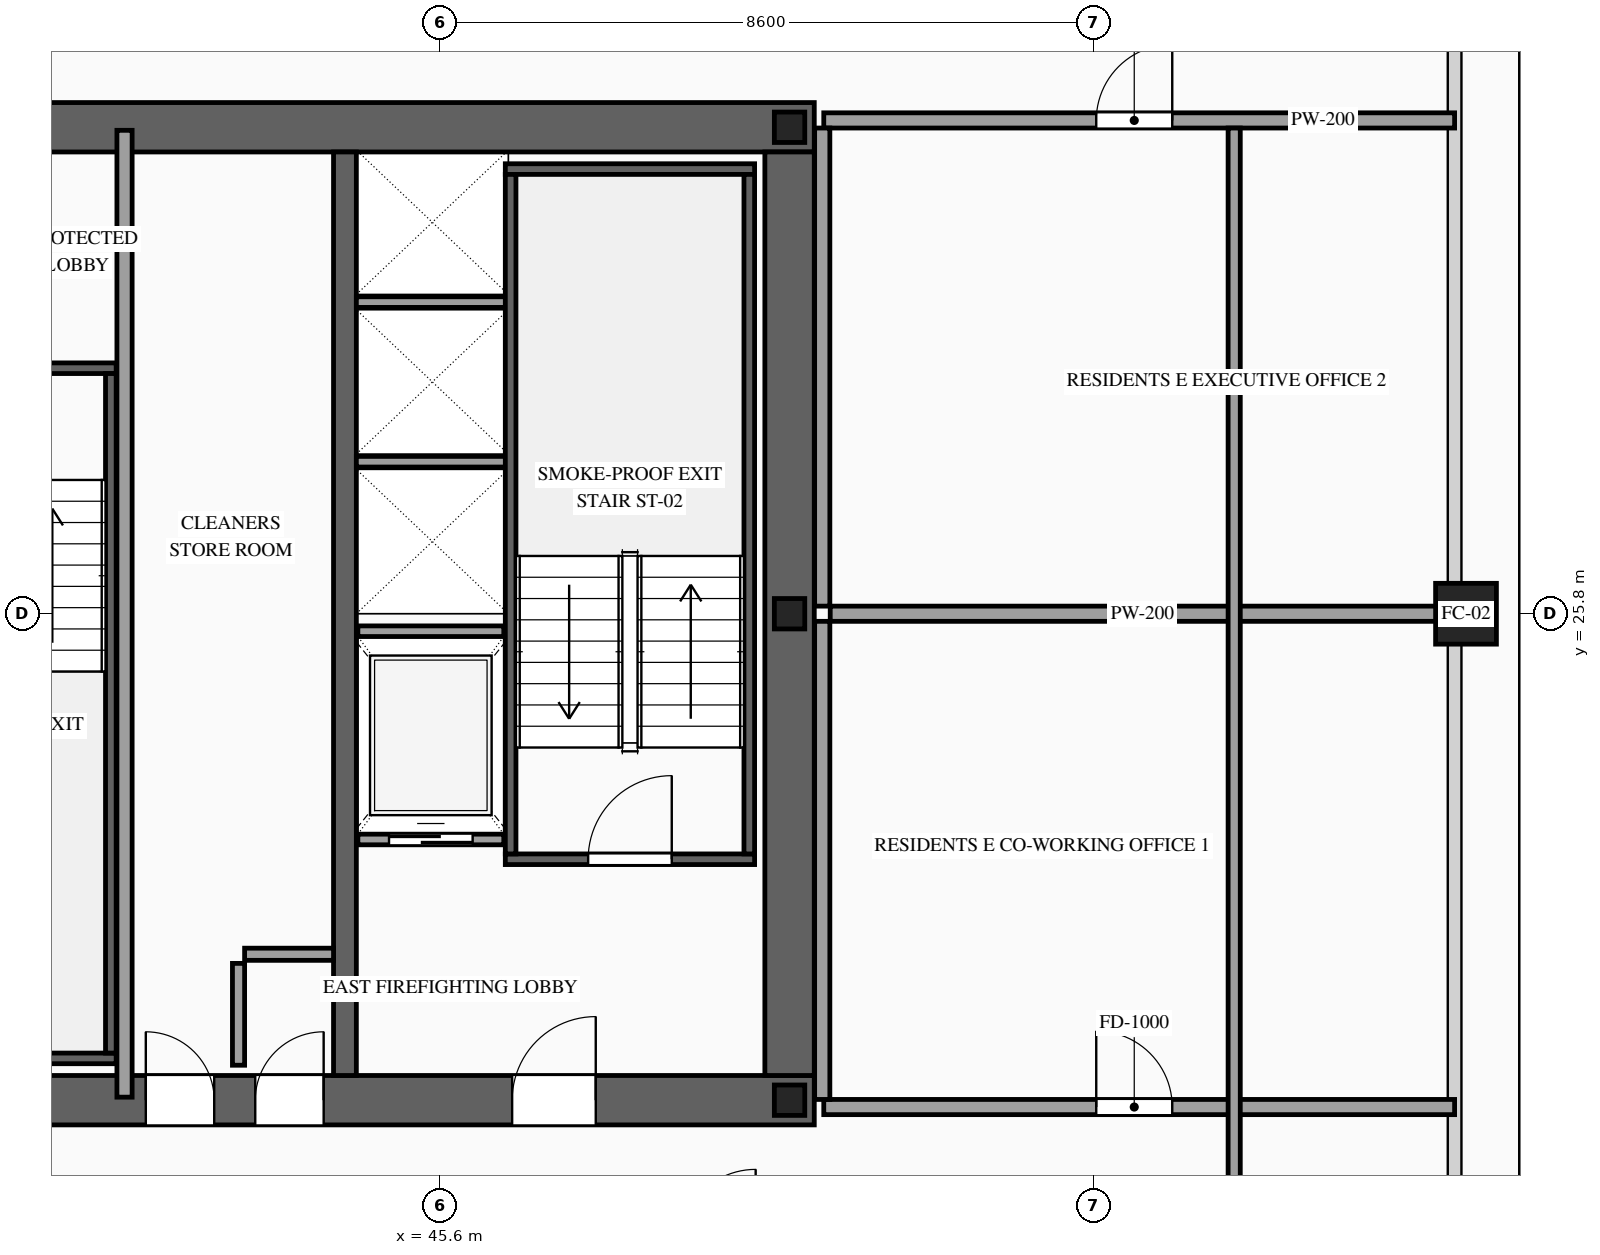
"""IFC4 building model, lengths in metres.
Left out: names, types, materials, properties, quantities, classifications, styles, units other than length and angle.
Written with IfcOpenShell. Run it as: python <this file> out.ifc"""

import sys

from ifc_helpers import new_model, si_unit, direction, frame, frame_2d, origin, origin_2d, place, context, subcontext, project, spatial, rectangle, hollow_rectangle, i_section, extrude, source, transform, mapped, element, fill, save


model = new_model("IFC4")
c1 = context("Model", 3, precision=1e-05, world=origin(), true_north=direction((0.0, 1.0)))
c2 = subcontext(c1, "Body", "Model", "MODEL_VIEW")
j1 = project(units=[si_unit("LENGTHUNIT", "METRE"), si_unit("PLANEANGLEUNIT", "RADIAN")], contexts=[c1])
p1 = place(None, origin())
s1 = spatial("IfcSite", under=j1, at=p1, CompositionType="ELEMENT")
p2 = place(p1, origin())
s2 = spatial("IfcBuilding", under=s1, at=p2, CompositionType="ELEMENT")
p3 = place(p2, frame((0.0, 0.0, 205.5)))
s3 = spatial("IfcBuildingStorey", under=s2, at=p3, CompositionType="ELEMENT", Elevation=205.5)
p4 = place(p3, frame((23.475, 19.4, 0.0), z_axis=(0.0, 0.0, 1.0), x_axis=(1.0, 0.0, 0.0)))
e1 = element("IfcWall", 1, at=p4, inside=s3, PredefinedType="SHEAR", context=c2, shape_type="SweptSolid", body=[
    extrude(rectangle(XDim=27.05, YDim=0.65, at=frame_2d((13.525, 0.0))), origin(), (0.0, 0.0, 1.0), 3.5),
])
p5 = place(p4, frame((1.975, 0.0, 0.0)))
e2 = element("IfcOpeningElement", 2, at=p5, cuts=e1, PredefinedType="OPENING", context=c2, shape_type="SweptSolid", body=[
    extrude(rectangle(XDim=1.1, YDim=2.2, at=frame_2d((0.55, 1.1))), frame((0.0, 0.34, 0.0), z_axis=(0.0, -1.0, 0.0), x_axis=(1.0, 0.0, 0.0)), (0.0, 0.0, 1.0), 0.68),
])
p6 = place(p4, frame((9.875, 0.0, 0.0)))
e3 = element("IfcOpeningElement", 3, at=p6, cuts=e1, PredefinedType="OPENING", context=c2, shape_type="SweptSolid", body=[
    extrude(rectangle(XDim=1.1, YDim=2.2, at=frame_2d((0.55, 1.1))), frame((0.0, 0.34, 0.0), z_axis=(0.0, -1.0, 0.0), x_axis=(1.0, 0.0, 0.0)), (0.0, 0.0, 1.0), 0.68),
])
p7 = place(p4, frame((23.075, 0.0, 0.0)))
e4 = element("IfcOpeningElement", 4, at=p7, cuts=e1, PredefinedType="OPENING", context=c2, shape_type="SweptSolid", body=[
    extrude(rectangle(XDim=1.1, YDim=2.2, at=frame_2d((0.55, 1.1))), frame((0.0, 0.34, 0.0), z_axis=(0.0, -1.0, 0.0), x_axis=(1.0, 0.0, 0.0)), (0.0, 0.0, 1.0), 0.68),
])
p8 = place(p4, frame((19.695, 0.0, 0.0)))
e5 = element("IfcOpeningElement", 5, at=p8, cuts=e1, PredefinedType="OPENING", context=c2, shape_type="SweptSolid", body=[
    extrude(rectangle(XDim=0.9, YDim=2.15, at=frame_2d((0.45, 1.075))), frame((0.0, 0.34, 0.0), z_axis=(0.0, -1.0, 0.0), x_axis=(1.0, 0.0, 0.0)), (0.0, 0.0, 1.0), 0.68),
])
p9 = place(p4, frame((18.255, 0.0, 0.0)))
e6 = element("IfcOpeningElement", 6, at=p9, cuts=e1, PredefinedType="OPENING", context=c2, shape_type="SweptSolid", body=[
    extrude(rectangle(XDim=0.9, YDim=2.15, at=frame_2d((0.45, 1.075))), frame((0.0, 0.34, 0.0), z_axis=(0.0, -1.0, 0.0), x_axis=(1.0, 0.0, 0.0)), (0.0, 0.0, 1.0), 0.68),
])
p10 = place(p3, frame((23.475, 32.2, 0.0), z_axis=(0.0, 0.0, 1.0), x_axis=(1.0, 0.0, 0.0)))
e7 = element("IfcWall", 7, at=p10, inside=s3, PredefinedType="SHEAR", context=c2, shape_type="SweptSolid", body=[
    extrude(rectangle(XDim=27.05, YDim=0.65, at=frame_2d((13.525, 0.0))), origin(), (0.0, 0.0, 1.0), 3.5),
])
p11 = place(p10, frame((4.595, 0.0, 0.0)))
e8 = element("IfcOpeningElement", 8, at=p11, cuts=e7, PredefinedType="OPENING", context=c2, shape_type="SweptSolid", body=[
    extrude(rectangle(XDim=0.9, YDim=2.15, at=frame_2d((0.45, 1.075))), frame((0.0, 0.34, 0.0), z_axis=(0.0, -1.0, 0.0), x_axis=(1.0, 0.0, 0.0)), (0.0, 0.0, 1.0), 0.68),
])
p12 = place(p10, frame((9.875, 0.0, 0.0)))
e9 = element("IfcOpeningElement", 9, at=p12, cuts=e7, PredefinedType="OPENING", context=c2, shape_type="SweptSolid", body=[
    extrude(rectangle(XDim=1.1, YDim=2.2, at=frame_2d((0.55, 1.1))), frame((0.0, 0.34, 0.0), z_axis=(0.0, -1.0, 0.0), x_axis=(1.0, 0.0, 0.0)), (0.0, 0.0, 1.0), 0.68),
])
p13 = place(p10, frame((15.725, 0.0, 0.0)))
e10 = element("IfcOpeningElement", 10, at=p13, cuts=e7, PredefinedType="OPENING", context=c2, shape_type="SweptSolid", body=[
    extrude(rectangle(XDim=1.1, YDim=2.2, at=frame_2d((0.55, 1.1))), frame((0.0, 0.34, 0.0), z_axis=(0.0, -1.0, 0.0), x_axis=(1.0, 0.0, 0.0)), (0.0, 0.0, 1.0), 0.68),
])
m1 = source(origin(), c2, "Body", "SweptSolid", [
    extrude(rectangle(XDim=12.15, YDim=0.65, at=frame_2d((6.075, 0.0))), origin(), (0.0, 0.0, 1.0), 3.5),
])
p14 = place(p3, frame((50.2, 19.725, 0.0), z_axis=(0.0, 0.0, 1.0), x_axis=(0.0, 1.0, 0.0)))
e11 = element("IfcWall", 11, at=p14, inside=s3, PredefinedType="SHEAR", context=c2, shape_type="MappedRepresentation", body=[
    mapped(m1, transform((0.0, 0.0, 0.0), scale=1.0)),
])
m2 = source(origin(), c2, "Body", "SweptSolid", [
    extrude(rectangle(XDim=12.15, YDim=0.3, at=frame_2d((6.075, 0.0))), origin(), (0.0, 0.0, 1.0), 3.5),
])
p15 = place(p3, frame((44.35, 19.725, 0.0), z_axis=(0.0, 0.0, 1.0), x_axis=(0.0, 1.0, 0.0)))
e12 = element("IfcWall", 12, at=p15, inside=s3, PredefinedType="SOLIDWALL", context=c2, shape_type="MappedRepresentation", body=[
    mapped(m2, transform((0.0, 0.0, 0.0), scale=1.0)),
])
m3 = source(origin(), c2, "Body", "SweptSolid", [
    extrude(i_section(OverallWidth=0.4, OverallDepth=0.4, WebThickness=0.013, FlangeThickness=0.021, at=origin_2d()), origin(), (0.0, 0.0, 1.0), 3.5),
])
for number, where, z_axis, x_axis in (
    (13, (50.2, 19.4, 0.0), (0.0, 0.0, 1.0), (1.0, 0.0, 0.0)),
    (14, (50.2, 25.8, 0.0), (0.0, 0.0, 1.0), (1.0, 0.0, 0.0)),
    (15, (50.2, 32.2, 0.0), (0.0, 0.0, 1.0), (1.0, 0.0, 0.0)),
):
    element("IfcColumn", number, at=place(p3, frame(where, z_axis=z_axis, x_axis=x_axis)), inside=s3, PredefinedType="COLUMN", context=c2, shape_type="MappedRepresentation", body=[
        mapped(m3, transform((0.0, 0.0, 0.0), scale=1.0)),
    ])
m4 = source(origin(), c2, "Body", "SweptSolid", [
    extrude(hollow_rectangle(XDim=0.8, YDim=0.8, WallThickness=0.036, at=origin_2d()), origin(), (0.0, 0.0, 1.0), 3.5),
])
p16 = place(p3, frame((59.1, 25.8, 0.0), z_axis=(0.0, 0.0, 1.0), x_axis=(1.0, 0.0, 0.0)))
e16 = element("IfcColumn", 16, at=p16, inside=s3, PredefinedType="COLUMN", context=c2, shape_type="MappedRepresentation", body=[
    mapped(m4, transform((0.0, 0.0, 0.0), scale=1.0)),
])
p17 = place(p3, frame((44.52, 22.83, 0.0), z_axis=(0.0, 0.0, 1.0), x_axis=(1.0, 0.0, 0.0)))
e17 = element("IfcWall", 17, at=p17, inside=s3, PredefinedType="SOLIDWALL", context=c2, shape_type="SweptSolid", body=[
    extrude(rectangle(XDim=1.92, YDim=0.14, at=frame_2d((0.96, 0.0))), origin(), (0.0, 0.0, 1.0), 3.28),
])
p18 = place(p17, frame((0.41, 0.0, 0.0)))
e18 = element("IfcOpeningElement", 18, at=p18, cuts=e17, PredefinedType="OPENING", context=c2, shape_type="SweptSolid", body=[
    extrude(rectangle(XDim=1.1, YDim=2.2, at=frame_2d((0.55, 1.1))), frame((0.0, 0.085, 0.0), z_axis=(0.0, -1.0, 0.0), x_axis=(1.0, 0.0, 0.0)), (0.0, 0.0, 1.0), 0.17),
])
m5 = source(origin(), c2, "Body", "SweptSolid", [
    extrude(rectangle(XDim=1.92, YDim=0.14, at=frame_2d((0.96, 0.0))), origin(), (0.0, 0.0, 1.0), 3.28),
])
p19 = place(p3, frame((44.52, 25.57, 0.0), z_axis=(0.0, 0.0, 1.0), x_axis=(1.0, 0.0, 0.0)))
e19 = element("IfcWall", 19, at=p19, inside=s3, PredefinedType="SOLIDWALL", context=c2, shape_type="MappedRepresentation", body=[
    mapped(m5, transform((0.0, 0.0, 0.0), scale=1.0)),
])
m6 = source(origin(), c2, "Body", "SweptSolid", [
    extrude(rectangle(XDim=2.0, YDim=0.14, at=frame_2d((1.0, 0.0))), origin(), (0.0, 0.0, 1.0), 3.28),
])
for number, where, z_axis, x_axis in (
    (20, (44.5, 27.8, 0.0), (0.0, 0.0, 1.0), (1.0, 0.0, 0.0)),
    (21, (44.5, 29.9, 0.0), (0.0, 0.0, 1.0), (1.0, 0.0, 0.0)),
):
    element("IfcWall", number, at=place(p3, frame(where, z_axis=z_axis, x_axis=x_axis)), inside=s3, PredefinedType="SOLIDWALL", context=c2, shape_type="MappedRepresentation", body=[
        mapped(m6, transform((0.0, 0.0, 0.0), scale=1.0)),
    ])
p20 = place(p3, frame((46.46, 22.57, 0.0), z_axis=(0.0, 0.0, 1.0), x_axis=(1.0, 0.0, 0.0)))
e22 = element("IfcWall", 22, at=p20, inside=s3, PredefinedType="SOLIDWALL", context=c2, shape_type="SweptSolid", body=[
    extrude(rectangle(XDim=3.28, YDim=0.14, at=frame_2d((1.64, 0.0))), origin(), (0.0, 0.0, 1.0), 3.28),
])
p21 = place(p20, frame((1.09, 0.0, 0.0)))
e23 = element("IfcOpeningElement", 23, at=p21, cuts=e22, PredefinedType="OPENING", context=c2, shape_type="SweptSolid", body=[
    extrude(rectangle(XDim=1.1, YDim=2.2, at=frame_2d((0.55, 1.1))), frame((0.0, 0.085, 0.0), z_axis=(0.0, -1.0, 0.0), x_axis=(1.0, 0.0, 0.0)), (0.0, 0.0, 1.0), 0.17),
])
m7 = source(origin(), c2, "Body", "SweptSolid", [
    extrude(rectangle(XDim=3.28, YDim=0.14, at=frame_2d((1.64, 0.0))), origin(), (0.0, 0.0, 1.0), 3.28),
])
p22 = place(p3, frame((46.46, 31.65, 0.0), z_axis=(0.0, 0.0, 1.0), x_axis=(1.0, 0.0, 0.0)))
e24 = element("IfcWall", 24, at=p22, inside=s3, PredefinedType="SOLIDWALL", context=c2, shape_type="MappedRepresentation", body=[
    mapped(m7, transform((0.0, 0.0, 0.0), scale=1.0)),
])
m8 = source(origin(), c2, "Body", "SweptSolid", [
    extrude(rectangle(XDim=8.94, YDim=0.14, at=frame_2d((4.47, 0.0))), origin(), (0.0, 0.0, 1.0), 3.28),
])
for number, where, z_axis, x_axis in (
    (25, (46.53, 22.64, 0.0), (0.0, 0.0, 1.0), (0.0, 1.0, 0.0)),
    (26, (49.67, 22.64, 0.0), (0.0, 0.0, 1.0), (0.0, 1.0, 0.0)),
):
    element("IfcWall", number, at=place(p3, frame(where, z_axis=z_axis, x_axis=x_axis)), inside=s3, PredefinedType="SOLIDWALL", context=c2, shape_type="MappedRepresentation", body=[
        mapped(m8, transform((0.0, 0.0, 0.0), scale=1.0)),
    ])
p23 = place(p3, frame((38.2, 29.03, 0.0), z_axis=(0.0, 0.0, 1.0), x_axis=(1.0, 0.0, 0.0)))
e27 = element("IfcWall", 27, at=p23, inside=s3, PredefinedType="SOLIDWALL", context=c2, shape_type="SweptSolid", body=[
    extrude(rectangle(XDim=3.14, YDim=0.14, at=frame_2d((1.57, 0.0))), origin(), (0.0, 0.0, 1.0), 3.28),
])
p24 = place(p23, frame((1.02, 0.0, 0.0)))
e28 = element("IfcOpeningElement", 28, at=p24, cuts=e27, PredefinedType="OPENING", context=c2, shape_type="SweptSolid", body=[
    extrude(rectangle(XDim=1.1, YDim=2.2, at=frame_2d((0.55, 1.1))), frame((0.0, 0.085, 0.0), z_axis=(0.0, -1.0, 0.0), x_axis=(1.0, 0.0, 0.0)), (0.0, 0.0, 1.0), 0.17),
])
m9 = source(origin(), c2, "Body", "SweptSolid", [
    extrude(rectangle(XDim=3.14, YDim=0.14, at=frame_2d((1.57, 0.0))), origin(), (0.0, 0.0, 1.0), 3.28),
])
p25 = place(p3, frame((38.2, 19.95, 0.0), z_axis=(0.0, 0.0, 1.0), x_axis=(1.0, 0.0, 0.0)))
e29 = element("IfcWall", 29, at=p25, inside=s3, PredefinedType="SOLIDWALL", context=c2, shape_type="MappedRepresentation", body=[
    mapped(m9, transform((0.0, 0.0, 0.0), scale=1.0)),
])
m10 = source(origin(), c2, "Body", "SweptSolid", [
    extrude(rectangle(XDim=8.94, YDim=0.14, at=frame_2d((4.47, 0.0))), origin(), (0.0, 0.0, 1.0), 3.28),
])
p26 = place(p3, frame((41.27, 20.02, 0.0), z_axis=(0.0, 0.0, 1.0), x_axis=(0.0, 1.0, 0.0)))
e30 = element("IfcWall", 30, at=p26, inside=s3, PredefinedType="SOLIDWALL", context=c2, shape_type="MappedRepresentation", body=[
    mapped(m10, transform((0.0, 0.0, 0.0), scale=1.0)),
])
m11 = source(origin(), c2, "Body", "SweptSolid", [
    extrude(rectangle(XDim=1.34, YDim=0.16, at=frame_2d((0.67, 0.0))), origin(), (0.0, 0.0, 1.0), 3.28),
])
p27 = place(p3, frame((42.95, 19.86, 0.0), z_axis=(0.0, 0.0, 1.0), x_axis=(0.0, 1.0, 0.0)))
e31 = element("IfcWall", 31, at=p27, inside=s3, PredefinedType="PARTITIONING", context=c2, shape_type="MappedRepresentation", body=[
    mapped(m11, transform((0.0, 0.0, 0.0), scale=1.0)),
])
m12 = source(origin(), c2, "Body", "SweptSolid", [
    extrude(rectangle(XDim=1.17, YDim=0.16, at=frame_2d((0.585, 0.0))), origin(), (0.0, 0.0, 1.0), 3.28),
])
p28 = place(p3, frame((43.03, 21.32, 0.0), z_axis=(0.0, 0.0, 1.0), x_axis=(1.0, 0.0, 0.0)))
e32 = element("IfcWall", 32, at=p28, inside=s3, PredefinedType="PARTITIONING", context=c2, shape_type="MappedRepresentation", body=[
    mapped(m12, transform((0.0, 0.0, 0.0), scale=1.0)),
])
m13 = source(origin(), c2, "Body", "SweptSolid", [
    extrude(rectangle(XDim=12.72, YDim=0.2, at=frame_2d((6.36, 0.0))), origin(), (0.0, 0.0, 1.0), 3.28),
])
p29 = place(p3, frame((41.45, 19.44, 0.0), z_axis=(0.0, 0.0, 1.0), x_axis=(0.0, 1.0, 0.0)))
e33 = element("IfcWall", 33, at=p29, inside=s3, PredefinedType="PARTITIONING", context=c2, shape_type="MappedRepresentation", body=[
    mapped(m13, transform((0.0, 0.0, 0.0), scale=1.0)),
])
p30 = place(p3, frame((50.65, 19.31, 0.0), z_axis=(0.0, 0.0, 1.0), x_axis=(1.0, 0.0, 0.0)))
e34 = element("IfcWall", 34, at=p30, inside=s3, PredefinedType="PARTITIONING", context=c2, shape_type="SweptSolid", body=[
    extrude(rectangle(XDim=8.3, YDim=0.2, at=frame_2d((4.15, 0.0))), origin(), (0.0, 0.0, 1.0), 2.775),
])
p31 = place(p30, frame((3.585, 0.0, 0.0)))
e35 = element("IfcOpeningElement", 35, at=p31, cuts=e34, PredefinedType="OPENING", context=c2, shape_type="SweptSolid", body=[
    extrude(rectangle(XDim=1.0, YDim=2.2, at=frame_2d((0.5, 1.1))), frame((0.0, 0.115, 0.0), z_axis=(0.0, -1.0, 0.0), x_axis=(1.0, 0.0, 0.0)), (0.0, 0.0, 1.0), 0.23),
])
m14 = source(origin(), c2, "Body", "SweptSolid", [
    extrude(rectangle(XDim=8.215, YDim=0.2, at=frame_2d((4.107, 0.0))), origin(), (0.0, 0.0, 1.0), 2.687),
])
p32 = place(p3, frame((50.735, 25.8, 0.0), z_axis=(0.0, 0.0, 1.0), x_axis=(1.0, 0.0, 0.0)))
e36 = element("IfcWall", 36, at=p32, inside=s3, PredefinedType="PARTITIONING", context=c2, shape_type="MappedRepresentation", body=[
    mapped(m14, transform((0.0, 0.0, 0.0), scale=1.0)),
])
m15 = source(origin(), c2, "Body", "SweptSolid", [
    extrude(rectangle(XDim=6.29, YDim=0.2, at=frame_2d((3.145, 0.0))), origin(), (0.0, 0.0, 1.0), 3.28),
])
p33 = place(p3, frame((50.63, 19.41, 0.0), z_axis=(0.0, 0.0, 1.0), x_axis=(0.0, 1.0, 0.0)))
e37 = element("IfcWall", 37, at=p33, inside=s3, PredefinedType="PARTITIONING", context=c2, shape_type="MappedRepresentation", body=[
    mapped(m15, transform((0.0, 0.0, 0.0), scale=1.0)),
])
p34 = place(p3, frame((50.65, 32.29, 0.0), z_axis=(0.0, 0.0, 1.0), x_axis=(1.0, 0.0, 0.0)))
e38 = element("IfcWall", 38, at=p34, inside=s3, PredefinedType="PARTITIONING", context=c2, shape_type="SweptSolid", body=[
    extrude(rectangle(XDim=8.3, YDim=0.2, at=frame_2d((4.15, 0.0))), origin(), (0.0, 0.0, 1.0), 2.775),
])
p35 = place(p34, frame((3.585, 0.0, 0.0)))
e39 = element("IfcOpeningElement", 39, at=p35, cuts=e38, PredefinedType="OPENING", context=c2, shape_type="SweptSolid", body=[
    extrude(rectangle(XDim=1.0, YDim=2.2, at=frame_2d((0.5, 1.1))), frame((0.0, 0.115, 0.0), z_axis=(0.0, -1.0, 0.0), x_axis=(1.0, 0.0, 0.0)), (0.0, 0.0, 1.0), 0.23),
])
m16 = source(origin(), c2, "Body", "SweptSolid", [
    extrude(rectangle(XDim=28.19, YDim=0.16, at=frame_2d((14.095, 0.0))), origin(), (0.0, 0.0, 1.0), 3.28),
])
p36 = place(p3, frame((56.05, 4.0, 0.0), z_axis=(0.0, 0.0, 1.0), x_axis=(0.0, 1.0, 0.0)))
e40 = element("IfcWall", 40, at=p36, inside=s3, PredefinedType="PARTITIONING", context=c2, shape_type="MappedRepresentation", body=[
    mapped(m16, transform((0.0, 0.0, 0.0), scale=1.0)),
])
p37 = place(p3, frame((50.63, 25.9, 0.0), z_axis=(0.0, 0.0, 1.0), x_axis=(0.0, 1.0, 0.0)))
e41 = element("IfcWall", 41, at=p37, inside=s3, PredefinedType="PARTITIONING", context=c2, shape_type="MappedRepresentation", body=[
    mapped(m15, transform((0.0, 0.0, 0.0), scale=1.0)),
])
m17 = source(origin(), c2, "Body", "SweptSolid", [
    extrude(rectangle(XDim=1.1, YDim=2.2, at=frame_2d((0.55, 1.1))), frame((0.0, 0.025, 0.0), z_axis=(0.0, -1.0, 0.0), x_axis=(1.0, 0.0, 0.0)), (0.0, 0.0, 1.0), 0.05),
])
p38 = place(p18, origin())
e42 = element("IfcDoor", 42, at=p38, inside=s3, OperationType="SLIDING_TO_RIGHT", PredefinedType="DOOR", context=c2, shape_type="MappedRepresentation", body=[
    mapped(m17, transform((0.0, 0.0, 0.0), scale=1.0)),
])
fill(e18, e42)
m18 = source(origin(), c2, "Body", "SweptSolid", [
    extrude(rectangle(XDim=1.1, YDim=2.2, at=frame_2d((0.55, 1.1))), frame((0.0, 0.025, 0.0), z_axis=(0.0, -1.0, 0.0), x_axis=(1.0, 0.0, 0.0)), (0.0, 0.0, 1.0), 0.05),
])
p39 = place(p21, origin())
e43 = element("IfcDoor", 43, at=p39, inside=s3, OperationType="SINGLE_SWING_RIGHT", PredefinedType="DOOR", context=c2, shape_type="MappedRepresentation", body=[
    mapped(m18, transform((0.0, 0.0, 0.0), scale=1.0)),
])
fill(e23, e43)
p40 = place(p7, origin())
e44 = element("IfcDoor", 44, at=p40, inside=s3, OperationType="SINGLE_SWING_RIGHT", PredefinedType="DOOR", context=c2, shape_type="MappedRepresentation", body=[
    mapped(m18, transform((0.0, 0.0, 0.0), scale=1.0)),
])
fill(e4, e44)
m19 = source(origin(), c2, "Body", "SweptSolid", [
    extrude(rectangle(XDim=0.9, YDim=2.15, at=frame_2d((0.45, 1.075))), frame((0.0, 0.025, 0.0), z_axis=(0.0, -1.0, 0.0), x_axis=(1.0, 0.0, 0.0)), (0.0, 0.0, 1.0), 0.05),
])
p41 = place(p8, origin())
e45 = element("IfcDoor", 45, at=p41, inside=s3, OperationType="SINGLE_SWING_RIGHT", PredefinedType="DOOR", context=c2, shape_type="MappedRepresentation", body=[
    mapped(m19, transform((0.0, 0.0, 0.0), scale=1.0)),
])
fill(e5, e45)
p42 = place(p9, origin())
e46 = element("IfcDoor", 46, at=p42, inside=s3, OperationType="SINGLE_SWING_LEFT", PredefinedType="DOOR", context=c2, shape_type="MappedRepresentation", body=[
    mapped(m19, transform((0.0, 0.0, 0.0), scale=1.0)),
])
fill(e6, e46)
m20 = source(origin(), c2, "Body", "SweptSolid", [
    extrude(rectangle(XDim=1.0, YDim=2.2, at=frame_2d((0.5, 1.1))), frame((0.0, 0.025, 0.0), z_axis=(0.0, -1.0, 0.0), x_axis=(1.0, 0.0, 0.0)), (0.0, 0.0, 1.0), 0.05),
])
p43 = place(p31, origin())
e47 = element("IfcDoor", 47, at=p43, inside=s3, OperationType="SINGLE_SWING_LEFT", PredefinedType="DOOR", context=c2, shape_type="MappedRepresentation", body=[
    mapped(m20, transform((0.0, 0.0, 0.0), scale=1.0)),
])
fill(e35, e47)
p44 = place(p35, origin())
e48 = element("IfcDoor", 48, at=p44, inside=s3, OperationType="SINGLE_SWING_RIGHT", PredefinedType="DOOR", context=c2, shape_type="MappedRepresentation", body=[
    mapped(m20, transform((0.0, 0.0, 0.0), scale=1.0)),
])
fill(e39, e48)
save(model, sys.argv[1])
